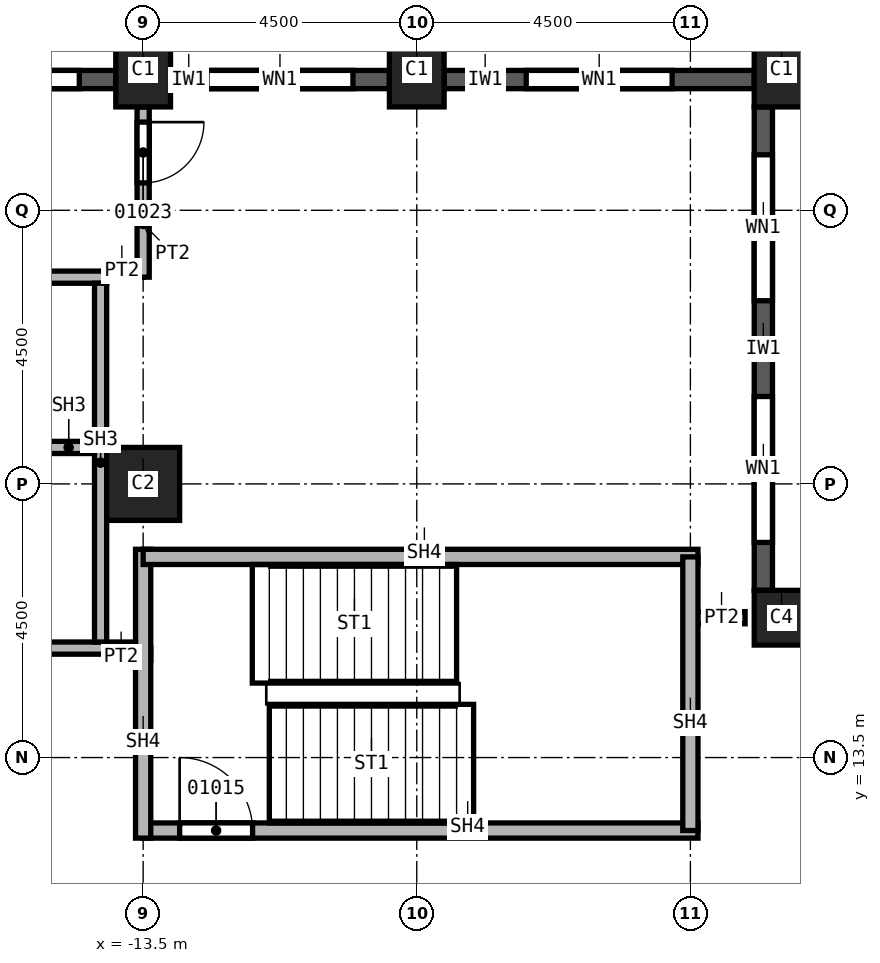
"""IFC4 building model, lengths in metres.
Left out: names, types, materials, properties, quantities, classifications, styles, units other than length and angle.
Written with IfcOpenShell. Run it as: python <this file> out.ifc"""

import sys

from ifc_helpers import new_model, si_unit, direction, frame, frame_2d, origin, origin_2d, place, context, subcontext, project, spatial, rectangle, extrude, element, fill, save


model = new_model("IFC4")
c1 = context("Model", 3, precision=1e-05, world=origin(), true_north=direction((0.0, 1.0)))
c2 = subcontext(c1, "Body", "Model", "MODEL_VIEW")
j1 = project(units=[si_unit("LENGTHUNIT", "METRE"), si_unit("PLANEANGLEUNIT", "RADIAN")], contexts=[c1])
p1 = place(None, origin())
s1 = spatial("IfcSite", under=j1, at=p1, CompositionType="ELEMENT")
p2 = place(p1, origin())
s2 = spatial("IfcBuilding", under=s1, at=p2, CompositionType="ELEMENT")
p3 = place(p2, frame((0.0, 0.0, 72.0)))
s3 = spatial("IfcBuildingStorey", under=s2, at=p3, CompositionType="ELEMENT", Elevation=72.0)
p4 = place(p3, frame((-13.5, 18.0, 0.0), z_axis=(0.0, 0.0, 1.0), x_axis=(1.0, 0.0, 0.0)))
e1 = element("IfcColumn", 1, at=p4, inside=s3, PredefinedType="COLUMN", context=c2, shape_type="SweptSolid", body=[
    extrude(rectangle(XDim=1.2, YDim=1.2, at=origin_2d()), origin(), (0.0, 0.0, 1.0), 3.7),
])
for number, where, z_axis, x_axis in (
    (2, (-3.0, 24.8, 0.0), (0.0, 0.0, 1.0), (1.0, 0.0, 0.0)),
    (3, (-9.0, 24.8, 0.0), (0.0, 0.0, 1.0), (1.0, 0.0, 0.0)),
    (4, (-13.5, 24.8, 0.0), (0.0, 0.0, 1.0), (1.0, 0.0, 0.0)),
):
    element("IfcColumn", number, at=place(p3, frame(where, z_axis=z_axis, x_axis=x_axis)), inside=s3, PredefinedType="COLUMN", context=c2, shape_type="SweptSolid", body=[
        extrude(rectangle(XDim=0.9, YDim=1.2, at=origin_2d()), origin(), (0.0, 0.0, 1.0), 3.7),
    ])
p5 = place(p3, frame((-3.0, 15.8, 0.0), z_axis=(0.0, 0.0, 1.0), x_axis=(1.0, 0.0, 0.0)))
e5 = element("IfcColumn", 5, at=p5, inside=s3, PredefinedType="COLUMN", context=c2, shape_type="SweptSolid", body=[
    extrude(rectangle(XDim=0.9, YDim=0.9, at=origin_2d()), origin(), (0.0, 0.0, 1.0), 3.7),
])
p6 = place(p3, frame((-3.3, 16.25, 0.0), z_axis=(0.0, 0.0, 1.0), x_axis=(0.0, 1.0, 0.0)))
e6 = element("IfcWall", 6, at=p6, inside=s3, PredefinedType="SOLIDWALL", context=c2, shape_type="SweptSolid", body=[
    extrude(rectangle(XDim=7.95, YDim=0.3, at=frame_2d((3.975, 0.0))), origin(), (0.0, 0.0, 1.0), 3.1),
])
p7 = place(p6, frame((0.788, 0.0, 0.8)))
e7 = element("IfcOpeningElement", 7, at=p7, cuts=e6, PredefinedType="OPENING", context=c2, shape_type="SweptSolid", body=[
    extrude(rectangle(XDim=2.4, YDim=1.95, at=frame_2d((1.2, 0.975))), frame((0.0, 0.15, 0.0), z_axis=(0.0, -1.0, 0.0), x_axis=(1.0, 0.0, 0.0)), (0.0, 0.0, 1.0), 0.3),
])
p8 = place(p6, frame((4.762, 0.0, 0.8)))
e8 = element("IfcOpeningElement", 8, at=p8, cuts=e6, PredefinedType="OPENING", context=c2, shape_type="SweptSolid", body=[
    extrude(rectangle(XDim=2.4, YDim=1.95, at=frame_2d((1.2, 0.975))), frame((0.0, 0.15, 0.0), z_axis=(0.0, -1.0, 0.0), x_axis=(1.0, 0.0, 0.0)), (0.0, 0.0, 1.0), 0.3),
])
p9 = place(p3, frame((-3.45, 24.65, 0.0), z_axis=(0.0, 0.0, 1.0), x_axis=(-1.0, 0.0, 0.0)))
e9 = element("IfcWall", 9, at=p9, inside=s3, PredefinedType="SOLIDWALL", context=c2, shape_type="SweptSolid", body=[
    extrude(rectangle(XDim=5.1, YDim=0.3, at=frame_2d((2.55, 0.0))), origin(), (0.0, 0.0, 1.0), 3.1),
])
p10 = place(p9, frame((1.35, 0.0, 0.8)))
e10 = element("IfcOpeningElement", 10, at=p10, cuts=e9, PredefinedType="OPENING", context=c2, shape_type="SweptSolid", body=[
    extrude(rectangle(XDim=2.4, YDim=1.95, at=frame_2d((1.2, 0.975))), frame((0.0, 0.15, 0.0), z_axis=(0.0, -1.0, 0.0), x_axis=(1.0, 0.0, 0.0)), (0.0, 0.0, 1.0), 0.3),
])
p11 = place(p3, frame((-9.45, 24.65, 0.0), z_axis=(0.0, 0.0, 1.0), x_axis=(-1.0, 0.0, 0.0)))
e11 = element("IfcWall", 11, at=p11, inside=s3, PredefinedType="SOLIDWALL", context=c2, shape_type="SweptSolid", body=[
    extrude(rectangle(XDim=3.6, YDim=0.3, at=frame_2d((1.8, 0.0))), origin(), (0.0, 0.0, 1.0), 3.1),
])
p12 = place(p11, frame((0.6, 0.0, 0.8)))
e12 = element("IfcOpeningElement", 12, at=p12, cuts=e11, PredefinedType="OPENING", context=c2, shape_type="SweptSolid", body=[
    extrude(rectangle(XDim=2.4, YDim=1.95, at=frame_2d((1.2, 0.975))), frame((0.0, 0.15, 0.0), z_axis=(0.0, -1.0, 0.0), x_axis=(1.0, 0.0, 0.0)), (0.0, 0.0, 1.0), 0.3),
])
p13 = place(p3, frame((-13.95, 24.65, 0.0), z_axis=(0.0, 0.0, 1.0), x_axis=(-1.0, 0.0, 0.0)))
e13 = element("IfcWall", 13, at=p13, inside=s3, PredefinedType="SOLIDWALL", context=c2, shape_type="SweptSolid", body=[
    extrude(rectangle(XDim=3.6, YDim=0.3, at=frame_2d((1.8, 0.0))), origin(), (0.0, 0.0, 1.0), 3.1),
])
p14 = place(p13, frame((0.6, 0.0, 0.8)))
e14 = element("IfcOpeningElement", 14, at=p14, cuts=e13, PredefinedType="OPENING", context=c2, shape_type="SweptSolid", body=[
    extrude(rectangle(XDim=2.4, YDim=1.95, at=frame_2d((1.2, 0.975))), frame((0.0, 0.15, 0.0), z_axis=(0.0, -1.0, 0.0), x_axis=(1.0, 0.0, 0.0)), (0.0, 0.0, 1.0), 0.3),
])
p15 = place(p3, frame((-14.1, 15.2, 0.0), z_axis=(0.0, 0.0, 1.0), x_axis=(1.0, 0.0, 0.0)))
e15 = element("IfcWall", 15, at=p15, inside=s3, PredefinedType="PARTITIONING", context=c2, shape_type="SweptSolid", body=[
    extrude(rectangle(XDim=0.725, YDim=0.2, at=frame_2d((0.363, 0.0))), origin(), (0.0, 0.0, 1.0), 3.7),
])
p16 = place(p3, frame((-13.5, 21.5, 0.0), z_axis=(0.0, 0.0, 1.0), x_axis=(-1.0, 0.0, 0.0)))
e16 = element("IfcWall", 16, at=p16, inside=s3, PredefinedType="PARTITIONING", context=c2, shape_type="SweptSolid", body=[
    extrude(rectangle(XDim=0.6, YDim=0.2, at=frame_2d((0.3, 0.0))), origin(), (0.0, 0.0, 1.0), 3.7),
])
p17 = place(p3, frame((-13.5, 24.2, 0.0), z_axis=(0.0, 0.0, 1.0), x_axis=(0.0, -1.0, 0.0)))
e17 = element("IfcWall", 17, at=p17, inside=s3, PredefinedType="PARTITIONING", context=c2, shape_type="SweptSolid", body=[
    extrude(rectangle(XDim=2.8, YDim=0.2, at=frame_2d((1.4, 0.0))), origin(), (0.0, 0.0, 1.0), 3.7),
])
p18 = place(p17, frame((0.25, 0.0, 0.0)))
e18 = element("IfcOpeningElement", 18, at=p18, cuts=e17, PredefinedType="OPENING", context=c2, shape_type="SweptSolid", body=[
    extrude(rectangle(XDim=1.0, YDim=2.1, at=frame_2d((0.5, 1.05))), frame((0.0, 0.1, 0.0), z_axis=(0.0, -1.0, 0.0), x_axis=(1.0, 0.0, 0.0)), (0.0, 0.0, 1.0), 0.2),
])
p19 = place(p3, frame((-4.5, 15.8, 0.0), z_axis=(0.0, 0.0, 1.0), x_axis=(1.0, 0.0, 0.0)))
e19 = element("IfcWall", 19, at=p19, inside=s3, PredefinedType="PARTITIONING", context=c2, shape_type="SweptSolid", body=[
    extrude(rectangle(XDim=0.9, YDim=0.2, at=frame_2d((0.45, 0.0))), origin(), (0.0, 0.0, 1.0), 3.7),
])
p20 = place(p3, frame((-13.5, 12.3, 0.0), z_axis=(0.0, 0.0, 1.0), x_axis=(1.0, 0.0, 0.0)))
e20 = element("IfcWall", 20, at=p20, inside=s3, PredefinedType="SOLIDWALL", context=c2, shape_type="SweptSolid", body=[
    extrude(rectangle(XDim=9.125, YDim=0.25, at=frame_2d((4.562, 0.0))), origin(), (0.0, 0.0, 1.0), 3.7),
])
p21 = place(p20, frame((0.6, 0.0, 0.0)))
e21 = element("IfcOpeningElement", 21, at=p21, cuts=e20, PredefinedType="OPENING", context=c2, shape_type="SweptSolid", body=[
    extrude(rectangle(XDim=1.2, YDim=2.1, at=frame_2d((0.6, 1.05))), frame((0.0, 0.125, 0.0), z_axis=(0.0, -1.0, 0.0), x_axis=(1.0, 0.0, 0.0)), (0.0, 0.0, 1.0), 0.25),
])
p22 = place(p3, frame((-13.5, 12.175, 0.0), z_axis=(0.0, 0.0, 1.0), x_axis=(0.0, 1.0, 0.0)))
e22 = element("IfcWall", 22, at=p22, inside=s3, PredefinedType="SOLIDWALL", context=c2, shape_type="SweptSolid", body=[
    extrude(rectangle(XDim=4.75, YDim=0.25, at=frame_2d((2.375, 0.0))), origin(), (0.0, 0.0, 1.0), 3.7),
])
p23 = place(p3, frame((-13.5, 16.8, 0.0), z_axis=(0.0, 0.0, 1.0), x_axis=(1.0, 0.0, 0.0)))
e23 = element("IfcWall", 23, at=p23, inside=s3, PredefinedType="SOLIDWALL", context=c2, shape_type="SweptSolid", body=[
    extrude(rectangle(XDim=9.125, YDim=0.25, at=frame_2d((4.562, 0.0))), origin(), (0.0, 0.0, 1.0), 3.7),
])
p24 = place(p3, frame((-4.5, 16.8, 0.0), z_axis=(0.0, 0.0, 1.0), x_axis=(0.0, -1.0, 0.0)))
e24 = element("IfcWall", 24, at=p24, inside=s3, PredefinedType="SOLIDWALL", context=c2, shape_type="SweptSolid", body=[
    extrude(rectangle(XDim=4.5, YDim=0.25, at=frame_2d((2.25, 0.0))), origin(), (0.0, 0.0, 1.0), 3.7),
])
p25 = place(p3, frame((-21.9, 15.3, 0.0), z_axis=(0.0, 0.0, 1.0), x_axis=(1.0, 0.0, 0.0)))
e25 = element("IfcWall", 25, at=p25, inside=s3, PredefinedType="SOLIDWALL", context=c2, shape_type="SweptSolid", body=[
    extrude(rectangle(XDim=8.275, YDim=0.2, at=frame_2d((4.137, 0.0))), origin(), (0.0, 0.0, 1.0), 3.7),
])
p26 = place(p25, frame((4.8, 0.0, 0.0)))
e26 = element("IfcOpeningElement", 26, at=p26, cuts=e25, PredefinedType="OPENING", context=c2, shape_type="SweptSolid", body=[
    extrude(rectangle(XDim=1.2, YDim=2.1, at=frame_2d((0.6, 1.05))), frame((0.0, 0.1, 0.0), z_axis=(0.0, -1.0, 0.0), x_axis=(1.0, 0.0, 0.0)), (0.0, 0.0, 1.0), 0.2),
])
p27 = place(p3, frame((-21.9, 21.4, 0.0), z_axis=(0.0, 0.0, 1.0), x_axis=(1.0, 0.0, 0.0)))
e27 = element("IfcWall", 27, at=p27, inside=s3, PredefinedType="SOLIDWALL", context=c2, shape_type="SweptSolid", body=[
    extrude(rectangle(XDim=7.8, YDim=0.2, at=frame_2d((3.9, 0.0))), origin(), (0.0, 0.0, 1.0), 3.7),
])
p28 = place(p27, frame((3.2, 0.0, 0.0)))
e28 = element("IfcOpeningElement", 28, at=p28, cuts=e27, PredefinedType="OPENING", context=c2, shape_type="SweptSolid", body=[
    extrude(rectangle(XDim=1.2, YDim=2.1, at=frame_2d((0.6, 1.05))), frame((0.0, 0.1, 0.0), z_axis=(0.0, -1.0, 0.0), x_axis=(1.0, 0.0, 0.0)), (0.0, 0.0, 1.0), 0.2),
])
p29 = place(p3, frame((-14.2, 15.4, 0.0), z_axis=(0.0, 0.0, 1.0), x_axis=(0.0, 1.0, 0.0)))
e29 = element("IfcWall", 29, at=p29, inside=s3, PredefinedType="SOLIDWALL", context=c2, shape_type="SweptSolid", body=[
    extrude(rectangle(XDim=5.9, YDim=0.2, at=frame_2d((2.95, 0.0))), origin(), (0.0, 0.0, 1.0), 3.7),
])
p30 = place(p3, frame((-17.1, 18.6, 0.0), z_axis=(0.0, 0.0, 1.0), x_axis=(1.0, 0.0, 0.0)))
e30 = element("IfcWall", 30, at=p30, inside=s3, PredefinedType="SOLIDWALL", context=c2, shape_type="SweptSolid", body=[
    extrude(rectangle(XDim=2.8, YDim=0.2, at=frame_2d((1.4, 0.0))), origin(), (0.0, 0.0, 1.0), 3.7),
])
p31 = place(p30, frame((0.85, 0.0, 0.0)))
e31 = element("IfcOpeningElement", 31, at=p31, cuts=e30, PredefinedType="OPENING", context=c2, shape_type="SweptSolid", body=[
    extrude(rectangle(XDim=1.1, YDim=2.1, at=frame_2d((0.55, 1.05))), frame((0.0, 0.1, 0.0), z_axis=(0.0, -1.0, 0.0), x_axis=(1.0, 0.0, 0.0)), (0.0, 0.0, 1.0), 0.2),
])
p32 = place(p7, origin())
e32 = element("IfcWindow", 32, at=p32, inside=s3, PartitioningType="SINGLE_PANEL", PredefinedType="WINDOW", context=c2, shape_type="SweptSolid", body=[
    extrude(rectangle(XDim=2.4, YDim=1.95, at=frame_2d((1.2, 0.975))), frame((0.0, 0.03, 0.0), z_axis=(0.0, -1.0, 0.0), x_axis=(1.0, 0.0, 0.0)), (0.0, 0.0, 1.0), 0.06),
])
fill(e7, e32)
p33 = place(p8, origin())
e33 = element("IfcWindow", 33, at=p33, inside=s3, PartitioningType="SINGLE_PANEL", PredefinedType="WINDOW", context=c2, shape_type="SweptSolid", body=[
    extrude(rectangle(XDim=2.4, YDim=1.95, at=frame_2d((1.2, 0.975))), frame((0.0, 0.03, 0.0), z_axis=(0.0, -1.0, 0.0), x_axis=(1.0, 0.0, 0.0)), (0.0, 0.0, 1.0), 0.06),
])
fill(e8, e33)
p34 = place(p10, origin())
e34 = element("IfcWindow", 34, at=p34, inside=s3, PartitioningType="SINGLE_PANEL", PredefinedType="WINDOW", context=c2, shape_type="SweptSolid", body=[
    extrude(rectangle(XDim=2.4, YDim=1.95, at=frame_2d((1.2, 0.975))), frame((0.0, 0.03, 0.0), z_axis=(0.0, -1.0, 0.0), x_axis=(1.0, 0.0, 0.0)), (0.0, 0.0, 1.0), 0.06),
])
fill(e10, e34)
p35 = place(p12, origin())
e35 = element("IfcWindow", 35, at=p35, inside=s3, PartitioningType="SINGLE_PANEL", PredefinedType="WINDOW", context=c2, shape_type="SweptSolid", body=[
    extrude(rectangle(XDim=2.4, YDim=1.95, at=frame_2d((1.2, 0.975))), frame((0.0, 0.03, 0.0), z_axis=(0.0, -1.0, 0.0), x_axis=(1.0, 0.0, 0.0)), (0.0, 0.0, 1.0), 0.06),
])
fill(e12, e35)
p36 = place(p14, origin())
e36 = element("IfcWindow", 36, at=p36, inside=s3, PartitioningType="SINGLE_PANEL", PredefinedType="WINDOW", context=c2, shape_type="SweptSolid", body=[
    extrude(rectangle(XDim=2.4, YDim=1.95, at=frame_2d((1.2, 0.975))), frame((0.0, 0.03, 0.0), z_axis=(0.0, -1.0, 0.0), x_axis=(1.0, 0.0, 0.0)), (0.0, 0.0, 1.0), 0.06),
])
fill(e14, e36)
p37 = place(p21, origin())
e37 = element("IfcDoor", 37, at=p37, inside=s3, OperationType="SINGLE_SWING_RIGHT", PredefinedType="DOOR", context=c2, shape_type="SweptSolid", body=[
    extrude(rectangle(XDim=1.2, YDim=2.1, at=frame_2d((0.6, 1.05))), frame((0.0, 0.025, 0.0), z_axis=(0.0, -1.0, 0.0), x_axis=(1.0, 0.0, 0.0)), (0.0, 0.0, 1.0), 0.05),
])
fill(e21, e37)
p38 = place(p18, origin())
e38 = element("IfcDoor", 38, at=p38, inside=s3, OperationType="SINGLE_SWING_RIGHT", PredefinedType="DOOR", context=c2, shape_type="SweptSolid", body=[
    extrude(rectangle(XDim=1.0, YDim=2.1, at=frame_2d((0.5, 1.05))), frame((0.0, 0.025, 0.0), z_axis=(0.0, -1.0, 0.0), x_axis=(1.0, 0.0, 0.0)), (0.0, 0.0, 1.0), 0.05),
])
fill(e18, e38)
save(model, sys.argv[1])
